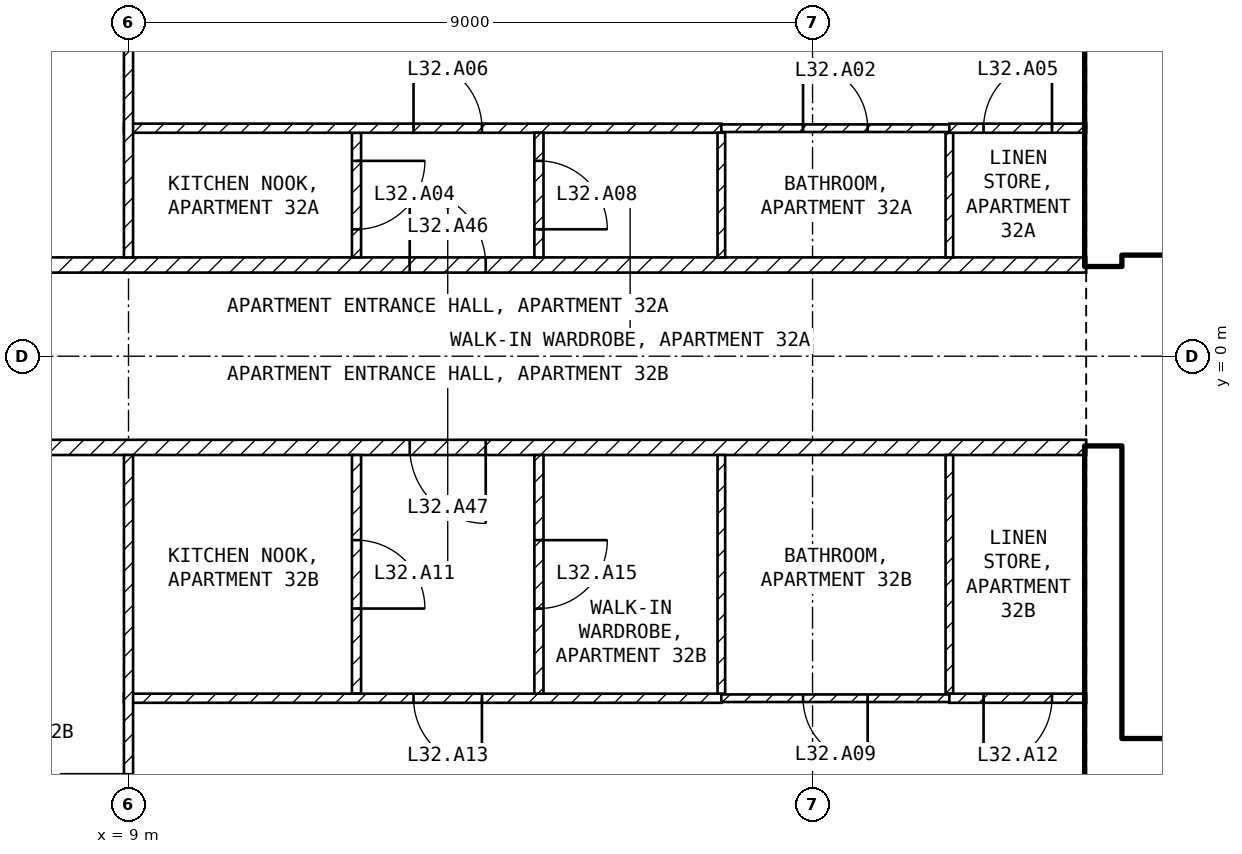
"""IFC4 building model, lengths in metres.
Left out: names, types, materials, properties, quantities, classifications, styles, units other than length and angle.
Written with IfcOpenShell. Run it as: python <this file> out.ifc"""

import sys

from ifc_helpers import new_model, si_unit, direction, frame, frame_2d, origin, place, context, subcontext, project, spatial, rectangle, extrude, element, fill, save


model = new_model("IFC4")
c1 = context("Model", 3, precision=1e-05, world=origin(), true_north=direction((0.0, 1.0)))
c2 = subcontext(c1, "Body", "Model", "MODEL_VIEW")
j1 = project(units=[si_unit("LENGTHUNIT", "METRE"), si_unit("PLANEANGLEUNIT", "RADIAN")], contexts=[c1])
p1 = place(None, origin())
s1 = spatial("IfcSite", under=j1, at=p1, CompositionType="ELEMENT")
p2 = place(p1, origin())
s2 = spatial("IfcBuilding", under=s1, at=p2, CompositionType="ELEMENT")
p3 = place(p2, frame((0.0, 0.0, 133.9)))
s3 = spatial("IfcBuildingStorey", under=s2, at=p3, CompositionType="ELEMENT", Elevation=133.9)
for number, where, z_axis, x_axis in (
    (1, (21.825, -8.1, 0.0), (0.0, 0.0, 1.0), (0.0, 1.0, 0.0)),
    (2, (21.825, 1.2, 0.0), (0.0, 0.0, 1.0), (0.0, 1.0, 0.0)),
):
    element("IfcWall", number, at=place(p3, frame(where, z_axis=z_axis, x_axis=x_axis)), inside=s3, PredefinedType="SHEAR", context=c2, shape_type="SweptSolid", body=[
        extrude(rectangle(XDim=6.9, YDim=0.45, at=frame_2d((3.45, 0.0))), origin(), (0.0, 0.0, 1.0), 3.25),
    ])
p4 = place(p3, frame((22.05, 1.45, 0.0), z_axis=(0.0, 0.0, 1.0), x_axis=(1.0, 0.0, 0.0)))
e3 = element("IfcWall", 3, at=p4, inside=s3, PredefinedType="SOLIDWALL", context=c2, shape_type="SweptSolid", body=[
    extrude(rectangle(XDim=11.0, YDim=0.2, at=frame_2d((5.5, 0.0))), origin(), (0.0, 0.0, 1.0), 3.25),
])
p5 = place(p4, frame((0.75, 0.0, 0.0)))
e4 = element("IfcOpeningElement", 4, at=p5, cuts=e3, PredefinedType="OPENING", context=c2, shape_type="SweptSolid", body=[
    extrude(rectangle(XDim=1.0, YDim=2.1, at=frame_2d((0.5, 1.05))), frame((0.0, 0.11, 0.0), z_axis=(0.0, -1.0, 0.0), x_axis=(1.0, 0.0, 0.0)), (0.0, 0.0, 1.0), 0.22),
])
p6 = place(p4, frame((3.25, 0.0, 0.0)))
e5 = element("IfcOpeningElement", 5, at=p6, cuts=e3, PredefinedType="OPENING", context=c2, shape_type="SweptSolid", body=[
    extrude(rectangle(XDim=1.0, YDim=2.1, at=frame_2d((0.5, 1.05))), frame((0.0, 0.11, 0.0), z_axis=(0.0, -1.0, 0.0), x_axis=(1.0, 0.0, 0.0)), (0.0, 0.0, 1.0), 0.22),
])
p7 = place(p4, frame((9.075, 0.0, 0.0)))
e6 = element("IfcOpeningElement", 6, at=p7, cuts=e3, PredefinedType="OPENING", context=c2, shape_type="SweptSolid", body=[
    extrude(rectangle(XDim=0.9, YDim=2.1, at=frame_2d((0.45, 1.05))), frame((0.0, 0.11, 0.0), z_axis=(0.0, -1.0, 0.0), x_axis=(1.0, 0.0, 0.0)), (0.0, 0.0, 1.0), 0.22),
])
p8 = place(p3, frame((22.05, -5.15, 0.0), z_axis=(0.0, 0.0, 1.0), x_axis=(1.0, 0.0, 0.0)))
e7 = element("IfcWall", 7, at=p8, inside=s3, PredefinedType="SOLIDWALL", context=c2, shape_type="SweptSolid", body=[
    extrude(rectangle(XDim=6.3, YDim=0.2, at=frame_2d((3.15, 0.0))), origin(), (0.0, 0.0, 1.0), 3.25),
])
p9 = place(p8, frame((0.2, 0.0, 0.0)))
e8 = element("IfcOpeningElement", 8, at=p9, cuts=e7, PredefinedType="OPENING", context=c2, shape_type="SweptSolid", body=[
    extrude(rectangle(XDim=1.0, YDim=2.1, at=frame_2d((0.5, 1.05))), frame((0.0, 0.11, 0.0), z_axis=(0.0, -1.0, 0.0), x_axis=(1.0, 0.0, 0.0)), (0.0, 0.0, 1.0), 0.22),
])
p10 = place(p3, frame((4.4, 1.2, 0.0), z_axis=(0.0, 0.0, 1.0), x_axis=(1.0, 0.0, 0.0)))
e9 = element("IfcWall", 9, at=p10, inside=s3, PredefinedType="PARTITIONING", context=c2, shape_type="SweptSolid", body=[
    extrude(rectangle(XDim=17.2, YDim=0.2, at=frame_2d((8.6, 0.0))), origin(), (0.0, 0.0, 1.0), 3.25),
])
p11 = place(p10, frame((8.3, 0.0, 0.0)))
e10 = element("IfcOpeningElement", 10, at=p11, cuts=e9, PredefinedType="OPENING", context=c2, shape_type="SweptSolid", body=[
    extrude(rectangle(XDim=1.0, YDim=2.1, at=frame_2d((0.5, 1.05))), frame((0.0, 0.11, 0.0), z_axis=(0.0, -1.0, 0.0), x_axis=(1.0, 0.0, 0.0)), (0.0, 0.0, 1.0), 0.22),
])
p12 = place(p3, frame((21.6, -1.2, 0.0), z_axis=(0.0, 0.0, 1.0), x_axis=(-1.0, 0.0, 0.0)))
e11 = element("IfcWall", 11, at=p12, inside=s3, PredefinedType="PARTITIONING", context=c2, shape_type="SweptSolid", body=[
    extrude(rectangle(XDim=17.2, YDim=0.2, at=frame_2d((8.6, 0.0))), origin(), (0.0, 0.0, 1.0), 3.25),
])
p13 = place(p12, frame((7.9, 0.0, 0.0)))
e12 = element("IfcOpeningElement", 12, at=p13, cuts=e11, PredefinedType="OPENING", context=c2, shape_type="SweptSolid", body=[
    extrude(rectangle(XDim=1.0, YDim=2.1, at=frame_2d((0.5, 1.05))), frame((0.0, 0.11, 0.0), z_axis=(0.0, -1.0, 0.0), x_axis=(1.0, 0.0, 0.0)), (0.0, 0.0, 1.0), 0.22),
])
p14 = place(p3, frame((12.0, 2.94, 0.0), z_axis=(0.0, 0.0, 1.0), x_axis=(0.0, -1.0, 0.0)))
e13 = element("IfcWall", 13, at=p14, inside=s3, PredefinedType="PARTITIONING", context=c2, shape_type="SweptSolid", body=[
    extrude(rectangle(XDim=1.64, YDim=0.12, at=frame_2d((0.82, 0.0))), origin(), (0.0, 0.0, 1.0), 3.25),
])
p15 = place(p14, frame((0.37, 0.0, 0.0)))
e14 = element("IfcOpeningElement", 14, at=p15, cuts=e13, PredefinedType="OPENING", context=c2, shape_type="SweptSolid", body=[
    extrude(rectangle(XDim=0.9, YDim=2.1, at=frame_2d((0.45, 1.05))), frame((0.0, 0.07, 0.0), z_axis=(0.0, -1.0, 0.0), x_axis=(1.0, 0.0, 0.0)), (0.0, 0.0, 1.0), 0.14),
])
p16 = place(p3, frame((8.94, 3.0, 0.0), z_axis=(0.0, 0.0, 1.0), x_axis=(1.0, 0.0, 0.0)))
e15 = element("IfcWall", 15, at=p16, inside=s3, PredefinedType="PARTITIONING", context=c2, shape_type="SweptSolid", body=[
    extrude(rectangle(XDim=7.86, YDim=0.12, at=frame_2d((3.93, 0.0))), origin(), (0.0, 0.0, 1.0), 3.25),
])
p17 = place(p16, frame((3.81, 0.0, 0.0)))
e16 = element("IfcOpeningElement", 16, at=p17, cuts=e15, PredefinedType="OPENING", context=c2, shape_type="SweptSolid", body=[
    extrude(rectangle(XDim=0.9, YDim=2.1, at=frame_2d((0.45, 1.05))), frame((0.0, 0.07, 0.0), z_axis=(0.0, -1.0, 0.0), x_axis=(1.0, 0.0, 0.0)), (0.0, 0.0, 1.0), 0.14),
])
p18 = place(p3, frame((9.0, 1.3, 0.0), z_axis=(0.0, 0.0, 1.0), x_axis=(0.0, 1.0, 0.0)))
e17 = element("IfcWall", 17, at=p18, inside=s3, PredefinedType="PARTITIONING", context=c2, shape_type="SweptSolid", body=[
    extrude(rectangle(XDim=7.62, YDim=0.12, at=frame_2d((3.81, 0.0))), origin(), (0.0, 0.0, 1.0), 3.25),
])
p19 = place(p18, frame((4.1, 0.0, 0.0)))
e18 = element("IfcOpeningElement", 18, at=p19, cuts=e17, PredefinedType="OPENING", context=c2, shape_type="SweptSolid", body=[
    extrude(rectangle(XDim=0.9, YDim=2.1, at=frame_2d((0.45, 1.05))), frame((0.0, 0.07, 0.0), z_axis=(0.0, -1.0, 0.0), x_axis=(1.0, 0.0, 0.0)), (0.0, 0.0, 1.0), 0.14),
])
p20 = place(p3, frame((14.4, 2.94, 0.0), z_axis=(0.0, 0.0, 1.0), x_axis=(0.0, -1.0, 0.0)))
e19 = element("IfcWall", 19, at=p20, inside=s3, PredefinedType="PARTITIONING", context=c2, shape_type="SweptSolid", body=[
    extrude(rectangle(XDim=1.64, YDim=0.12, at=frame_2d((0.82, 0.0))), origin(), (0.0, 0.0, 1.0), 3.25),
])
p21 = place(p20, frame((0.37, 0.0, 0.0)))
e20 = element("IfcOpeningElement", 20, at=p21, cuts=e19, PredefinedType="OPENING", context=c2, shape_type="SweptSolid", body=[
    extrude(rectangle(XDim=0.9, YDim=2.1, at=frame_2d((0.45, 1.05))), frame((0.0, 0.07, 0.0), z_axis=(0.0, -1.0, 0.0), x_axis=(1.0, 0.0, 0.0)), (0.0, 0.0, 1.0), 0.14),
])
for number, where, z_axis, x_axis in (
    (21, (16.8, 2.94, 0.0), (0.0, 0.0, 1.0), (0.0, -1.0, 0.0)),
    (22, (19.8, 2.94, 0.0), (0.0, 0.0, 1.0), (0.0, -1.0, 0.0)),
):
    element("IfcWall", number, at=place(p3, frame(where, z_axis=z_axis, x_axis=x_axis)), inside=s3, PredefinedType="PARTITIONING", context=c2, shape_type="SweptSolid", body=[
        extrude(rectangle(XDim=1.64, YDim=0.1, at=frame_2d((0.82, 0.0))), origin(), (0.0, 0.0, 1.0), 3.25),
    ])
p22 = place(p3, frame((16.8, 3.0, 0.0), z_axis=(0.0, 0.0, 1.0), x_axis=(1.0, 0.0, 0.0)))
e23 = element("IfcWall", 23, at=p22, inside=s3, PredefinedType="PARTITIONING", context=c2, shape_type="SweptSolid", body=[
    extrude(rectangle(XDim=3.0, YDim=0.1, at=frame_2d((1.5, 0.0))), origin(), (0.0, 0.0, 1.0), 3.25),
])
p23 = place(p22, frame((1.075, 0.0, 0.0)))
e24 = element("IfcOpeningElement", 24, at=p23, cuts=e23, PredefinedType="OPENING", context=c2, shape_type="SweptSolid", body=[
    extrude(rectangle(XDim=0.85, YDim=2.1, at=frame_2d((0.425, 1.05))), frame((0.0, 0.06, 0.0), z_axis=(0.0, -1.0, 0.0), x_axis=(1.0, 0.0, 0.0)), (0.0, 0.0, 1.0), 0.12),
])
p24 = place(p3, frame((19.8, 3.0, 0.0), z_axis=(0.0, 0.0, 1.0), x_axis=(1.0, 0.0, 0.0)))
e25 = element("IfcWall", 25, at=p24, inside=s3, PredefinedType="PARTITIONING", context=c2, shape_type="SweptSolid", body=[
    extrude(rectangle(XDim=1.8, YDim=0.12, at=frame_2d((0.9, 0.0))), origin(), (0.0, 0.0, 1.0), 3.25),
])
p25 = place(p24, frame((0.45, 0.0, 0.0)))
e26 = element("IfcOpeningElement", 26, at=p25, cuts=e25, PredefinedType="OPENING", context=c2, shape_type="SweptSolid", body=[
    extrude(rectangle(XDim=0.9, YDim=2.1, at=frame_2d((0.45, 1.05))), frame((0.0, 0.07, 0.0), z_axis=(0.0, -1.0, 0.0), x_axis=(1.0, 0.0, 0.0)), (0.0, 0.0, 1.0), 0.14),
])
p26 = place(p3, frame((12.0, -1.3, 0.0), z_axis=(0.0, 0.0, 1.0), x_axis=(0.0, -1.0, 0.0)))
e27 = element("IfcWall", 27, at=p26, inside=s3, PredefinedType="PARTITIONING", context=c2, shape_type="SweptSolid", body=[
    extrude(rectangle(XDim=3.14, YDim=0.12, at=frame_2d((1.57, 0.0))), origin(), (0.0, 0.0, 1.0), 3.25),
])
p27 = place(p26, frame((1.12, 0.0, 0.0)))
e28 = element("IfcOpeningElement", 28, at=p27, cuts=e27, PredefinedType="OPENING", context=c2, shape_type="SweptSolid", body=[
    extrude(rectangle(XDim=0.9, YDim=2.1, at=frame_2d((0.45, 1.05))), frame((0.0, 0.07, 0.0), z_axis=(0.0, -1.0, 0.0), x_axis=(1.0, 0.0, 0.0)), (0.0, 0.0, 1.0), 0.14),
])
p28 = place(p3, frame((16.8, -4.5, 0.0), z_axis=(0.0, 0.0, 1.0), x_axis=(-1.0, 0.0, 0.0)))
e29 = element("IfcWall", 29, at=p28, inside=s3, PredefinedType="PARTITIONING", context=c2, shape_type="SweptSolid", body=[
    extrude(rectangle(XDim=7.86, YDim=0.12, at=frame_2d((3.93, 0.0))), origin(), (0.0, 0.0, 1.0), 3.25),
])
p29 = place(p28, frame((3.15, 0.0, 0.0)))
e30 = element("IfcOpeningElement", 30, at=p29, cuts=e29, PredefinedType="OPENING", context=c2, shape_type="SweptSolid", body=[
    extrude(rectangle(XDim=0.9, YDim=2.1, at=frame_2d((0.45, 1.05))), frame((0.0, 0.07, 0.0), z_axis=(0.0, -1.0, 0.0), x_axis=(1.0, 0.0, 0.0)), (0.0, 0.0, 1.0), 0.14),
])
p30 = place(p3, frame((9.0, -8.92, 0.0), z_axis=(0.0, 0.0, 1.0), x_axis=(0.0, 1.0, 0.0)))
e31 = element("IfcWall", 31, at=p30, inside=s3, PredefinedType="PARTITIONING", context=c2, shape_type="SweptSolid", body=[
    extrude(rectangle(XDim=7.62, YDim=0.12, at=frame_2d((3.81, 0.0))), origin(), (0.0, 0.0, 1.0), 3.25),
])
p31 = place(p30, frame((2.52, 0.0, 0.0)))
e32 = element("IfcOpeningElement", 32, at=p31, cuts=e31, PredefinedType="OPENING", context=c2, shape_type="SweptSolid", body=[
    extrude(rectangle(XDim=0.9, YDim=2.1, at=frame_2d((0.45, 1.05))), frame((0.0, 0.07, 0.0), z_axis=(0.0, -1.0, 0.0), x_axis=(1.0, 0.0, 0.0)), (0.0, 0.0, 1.0), 0.14),
])
p32 = place(p3, frame((14.4, -1.3, 0.0), z_axis=(0.0, 0.0, 1.0), x_axis=(0.0, -1.0, 0.0)))
e33 = element("IfcWall", 33, at=p32, inside=s3, PredefinedType="PARTITIONING", context=c2, shape_type="SweptSolid", body=[
    extrude(rectangle(XDim=3.14, YDim=0.12, at=frame_2d((1.57, 0.0))), origin(), (0.0, 0.0, 1.0), 3.25),
])
p33 = place(p32, frame((1.12, 0.0, 0.0)))
e34 = element("IfcOpeningElement", 34, at=p33, cuts=e33, PredefinedType="OPENING", context=c2, shape_type="SweptSolid", body=[
    extrude(rectangle(XDim=0.9, YDim=2.1, at=frame_2d((0.45, 1.05))), frame((0.0, 0.07, 0.0), z_axis=(0.0, -1.0, 0.0), x_axis=(1.0, 0.0, 0.0)), (0.0, 0.0, 1.0), 0.14),
])
for number, where, z_axis, x_axis in (
    (35, (16.8, -1.3, 0.0), (0.0, 0.0, 1.0), (0.0, -1.0, 0.0)),
    (36, (19.8, -1.3, 0.0), (0.0, 0.0, 1.0), (0.0, -1.0, 0.0)),
):
    element("IfcWall", number, at=place(p3, frame(where, z_axis=z_axis, x_axis=x_axis)), inside=s3, PredefinedType="PARTITIONING", context=c2, shape_type="SweptSolid", body=[
        extrude(rectangle(XDim=3.14, YDim=0.1, at=frame_2d((1.57, 0.0))), origin(), (0.0, 0.0, 1.0), 3.25),
    ])
p34 = place(p3, frame((19.8, -4.5, 0.0), z_axis=(0.0, 0.0, 1.0), x_axis=(-1.0, 0.0, 0.0)))
e37 = element("IfcWall", 37, at=p34, inside=s3, PredefinedType="PARTITIONING", context=c2, shape_type="SweptSolid", body=[
    extrude(rectangle(XDim=3.0, YDim=0.1, at=frame_2d((1.5, 0.0))), origin(), (0.0, 0.0, 1.0), 3.25),
])
p35 = place(p34, frame((1.075, 0.0, 0.0)))
e38 = element("IfcOpeningElement", 38, at=p35, cuts=e37, PredefinedType="OPENING", context=c2, shape_type="SweptSolid", body=[
    extrude(rectangle(XDim=0.85, YDim=2.1, at=frame_2d((0.425, 1.05))), frame((0.0, 0.06, 0.0), z_axis=(0.0, -1.0, 0.0), x_axis=(1.0, 0.0, 0.0)), (0.0, 0.0, 1.0), 0.12),
])
p36 = place(p3, frame((21.6, -4.5, 0.0), z_axis=(0.0, 0.0, 1.0), x_axis=(-1.0, 0.0, 0.0)))
e39 = element("IfcWall", 39, at=p36, inside=s3, PredefinedType="PARTITIONING", context=c2, shape_type="SweptSolid", body=[
    extrude(rectangle(XDim=1.8, YDim=0.12, at=frame_2d((0.9, 0.0))), origin(), (0.0, 0.0, 1.0), 3.25),
])
p37 = place(p36, frame((0.45, 0.0, 0.0)))
e40 = element("IfcOpeningElement", 40, at=p37, cuts=e39, PredefinedType="OPENING", context=c2, shape_type="SweptSolid", body=[
    extrude(rectangle(XDim=0.9, YDim=2.1, at=frame_2d((0.45, 1.05))), frame((0.0, 0.07, 0.0), z_axis=(0.0, -1.0, 0.0), x_axis=(1.0, 0.0, 0.0)), (0.0, 0.0, 1.0), 0.14),
])
p38 = place(p9, origin())
e41 = element("IfcDoor", 41, at=p38, inside=s3, OperationType="SINGLE_SWING_LEFT", PredefinedType="DOOR", context=c2, shape_type="SweptSolid", body=[
    extrude(rectangle(XDim=1.0, YDim=2.1, at=frame_2d((0.5, 1.05))), frame((0.0, 0.025, 0.0), z_axis=(0.0, -1.0, 0.0), x_axis=(1.0, 0.0, 0.0)), (0.0, 0.0, 1.0), 0.05),
])
fill(e8, e41)
p39 = place(p23, origin())
e42 = element("IfcDoor", 42, at=p39, inside=s3, OperationType="SINGLE_SWING_LEFT", PredefinedType="DOOR", context=c2, shape_type="SweptSolid", body=[
    extrude(rectangle(XDim=0.85, YDim=2.1, at=frame_2d((0.425, 1.05))), frame((0.0, 0.025, 0.0), z_axis=(0.0, -1.0, 0.0), x_axis=(1.0, 0.0, 0.0)), (0.0, 0.0, 1.0), 0.05),
])
fill(e24, e42)
p40 = place(p15, origin())
e43 = element("IfcDoor", 43, at=p40, inside=s3, OperationType="SINGLE_SWING_LEFT", PredefinedType="DOOR", context=c2, shape_type="SweptSolid", body=[
    extrude(rectangle(XDim=0.9, YDim=2.1, at=frame_2d((0.45, 1.05))), frame((0.0, 0.025, 0.0), z_axis=(0.0, -1.0, 0.0), x_axis=(1.0, 0.0, 0.0)), (0.0, 0.0, 1.0), 0.05),
])
fill(e14, e43)
p41 = place(p25, origin())
e44 = element("IfcDoor", 44, at=p41, inside=s3, OperationType="SINGLE_SWING_RIGHT", PredefinedType="DOOR", context=c2, shape_type="SweptSolid", body=[
    extrude(rectangle(XDim=0.9, YDim=2.1, at=frame_2d((0.45, 1.05))), frame((0.0, 0.025, 0.0), z_axis=(0.0, -1.0, 0.0), x_axis=(1.0, 0.0, 0.0)), (0.0, 0.0, 1.0), 0.05),
])
fill(e26, e44)
p42 = place(p17, origin())
e45 = element("IfcDoor", 45, at=p42, inside=s3, OperationType="SINGLE_SWING_LEFT", PredefinedType="DOOR", context=c2, shape_type="SweptSolid", body=[
    extrude(rectangle(XDim=0.9, YDim=2.1, at=frame_2d((0.45, 1.05))), frame((0.0, 0.025, 0.0), z_axis=(0.0, -1.0, 0.0), x_axis=(1.0, 0.0, 0.0)), (0.0, 0.0, 1.0), 0.05),
])
fill(e16, e45)
p43 = place(p21, origin())
e46 = element("IfcDoor", 46, at=p43, inside=s3, OperationType="SINGLE_SWING_RIGHT", PredefinedType="DOOR", context=c2, shape_type="SweptSolid", body=[
    extrude(rectangle(XDim=0.9, YDim=2.1, at=frame_2d((0.45, 1.05))), frame((0.0, 0.025, 0.0), z_axis=(0.0, -1.0, 0.0), x_axis=(1.0, 0.0, 0.0)), (0.0, 0.0, 1.0), 0.05),
])
fill(e20, e46)
p44 = place(p35, origin())
e47 = element("IfcDoor", 47, at=p44, inside=s3, OperationType="SINGLE_SWING_LEFT", PredefinedType="DOOR", context=c2, shape_type="SweptSolid", body=[
    extrude(rectangle(XDim=0.85, YDim=2.1, at=frame_2d((0.425, 1.05))), frame((0.0, 0.025, 0.0), z_axis=(0.0, -1.0, 0.0), x_axis=(1.0, 0.0, 0.0)), (0.0, 0.0, 1.0), 0.05),
])
fill(e38, e47)
p45 = place(p27, origin())
e48 = element("IfcDoor", 48, at=p45, inside=s3, OperationType="SINGLE_SWING_RIGHT", PredefinedType="DOOR", context=c2, shape_type="SweptSolid", body=[
    extrude(rectangle(XDim=0.9, YDim=2.1, at=frame_2d((0.45, 1.05))), frame((0.0, 0.025, 0.0), z_axis=(0.0, -1.0, 0.0), x_axis=(1.0, 0.0, 0.0)), (0.0, 0.0, 1.0), 0.05),
])
fill(e28, e48)
p46 = place(p37, origin())
e49 = element("IfcDoor", 49, at=p46, inside=s3, OperationType="SINGLE_SWING_RIGHT", PredefinedType="DOOR", context=c2, shape_type="SweptSolid", body=[
    extrude(rectangle(XDim=0.9, YDim=2.1, at=frame_2d((0.45, 1.05))), frame((0.0, 0.025, 0.0), z_axis=(0.0, -1.0, 0.0), x_axis=(1.0, 0.0, 0.0)), (0.0, 0.0, 1.0), 0.05),
])
fill(e40, e49)
p47 = place(p29, origin())
e50 = element("IfcDoor", 50, at=p47, inside=s3, OperationType="SINGLE_SWING_LEFT", PredefinedType="DOOR", context=c2, shape_type="SweptSolid", body=[
    extrude(rectangle(XDim=0.9, YDim=2.1, at=frame_2d((0.45, 1.05))), frame((0.0, 0.025, 0.0), z_axis=(0.0, -1.0, 0.0), x_axis=(1.0, 0.0, 0.0)), (0.0, 0.0, 1.0), 0.05),
])
fill(e30, e50)
p48 = place(p33, origin())
e51 = element("IfcDoor", 51, at=p48, inside=s3, OperationType="SINGLE_SWING_LEFT", PredefinedType="DOOR", context=c2, shape_type="SweptSolid", body=[
    extrude(rectangle(XDim=0.9, YDim=2.1, at=frame_2d((0.45, 1.05))), frame((0.0, 0.025, 0.0), z_axis=(0.0, -1.0, 0.0), x_axis=(1.0, 0.0, 0.0)), (0.0, 0.0, 1.0), 0.05),
])
fill(e34, e51)
p49 = place(p11, origin())
e52 = element("IfcDoor", 52, at=p49, inside=s3, OperationType="SINGLE_SWING_LEFT", PredefinedType="DOOR", context=c2, shape_type="SweptSolid", body=[
    extrude(rectangle(XDim=1.0, YDim=2.1, at=frame_2d((0.5, 1.05))), frame((0.0, 0.025, 0.0), z_axis=(0.0, -1.0, 0.0), x_axis=(1.0, 0.0, 0.0)), (0.0, 0.0, 1.0), 0.05),
])
fill(e10, e52)
p50 = place(p13, origin())
e53 = element("IfcDoor", 53, at=p50, inside=s3, OperationType="SINGLE_SWING_LEFT", PredefinedType="DOOR", context=c2, shape_type="SweptSolid", body=[
    extrude(rectangle(XDim=1.0, YDim=2.1, at=frame_2d((0.5, 1.05))), frame((0.0, 0.025, 0.0), z_axis=(0.0, -1.0, 0.0), x_axis=(1.0, 0.0, 0.0)), (0.0, 0.0, 1.0), 0.05),
])
fill(e12, e53)
save(model, sys.argv[1])
